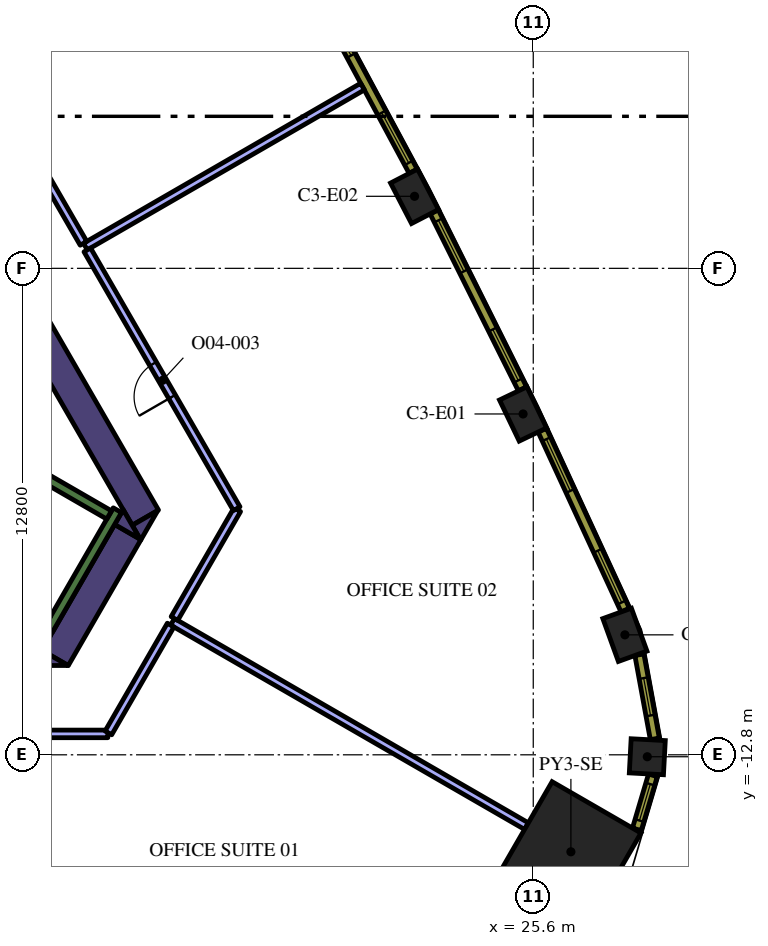
"""IFC4 building model, lengths in metres.
Left out: names, types, materials, properties, quantities, classifications, styles, units other than length and angle.
Written with IfcOpenShell. Run it as: python <this file> out.ifc"""

import sys

from ifc_helpers import new_model, si_unit, direction, frame, frame_2d, origin, origin_2d, place, context, subcontext, project, spatial, polyline, rectangle, outline, extrude, element, fill, save


model = new_model("IFC4")
c1 = context("Model", 3, precision=1e-05, world=origin(), true_north=direction((0.0, 1.0)))
c2 = subcontext(c1, "Body", "Model", "MODEL_VIEW")
j1 = project(units=[si_unit("LENGTHUNIT", "METRE"), si_unit("PLANEANGLEUNIT", "RADIAN")], contexts=[c1])
p1 = place(None, origin())
s1 = spatial("IfcSite", under=j1, at=p1, CompositionType="ELEMENT")
p2 = place(p1, origin())
s2 = spatial("IfcBuilding", under=s1, at=p2, CompositionType="ELEMENT")
p3 = place(p2, frame((0.0, 0.0, 179.4)))
s3 = spatial("IfcBuildingStorey", under=s2, at=p3, CompositionType="ELEMENT", Elevation=179.4)
p4 = place(p3, frame((26.591, -15.352, 0.0), z_axis=(0.0, 0.0, 1.0), x_axis=(0.866025403784, -0.5, 0.0)))
e1 = element("IfcColumn", 1, at=p4, inside=s3, PredefinedType="COLUMN", context=c2, shape_type="SweptSolid", body=[
    extrude(rectangle(XDim=2.7, YDim=2.7, at=origin_2d()), origin(), (0.0, 0.0, 1.0), 4.2),
])
p5 = place(p3, frame((28.601, -12.851, 0.0), z_axis=(0.0, 0.0, 1.0), x_axis=(0.0533921468, 0.998573622053, 0.0)))
e2 = element("IfcColumn", 2, at=p5, inside=s3, PredefinedType="COLUMN", context=c2, shape_type="SweptSolid", body=[
    extrude(rectangle(XDim=0.9, YDim=0.9, at=origin_2d()), origin(), (0.0, 0.0, 1.0), 4.2),
])
for number, where, z_axis, x_axis in (
    (3, (28.012, -9.644, 0.0), (0.0, 0.0, 1.0), (-0.341, 0.94, 0.0)),
    (4, (25.332, -3.832, 0.0), (0.0, 0.0, 1.0), (-0.433, 0.902, 0.0)),
    (5, (22.476, 1.896, 0.0), (0.0, 0.0, 1.0), (-0.46, 0.888, 0.0)),
):
    element("IfcColumn", number, at=place(p3, frame(where, z_axis=z_axis, x_axis=x_axis)), inside=s3, PredefinedType="COLUMN", context=c2, shape_type="SweptSolid", body=[
        extrude(rectangle(XDim=1.2, YDim=0.8, at=origin_2d()), origin(), (0.0, 0.0, 1.0), 4.2),
    ])
p6 = place(p3, frame((9.129, 4.289, 0.0), z_axis=(0.0, 0.0, 1.0), x_axis=(0.499995742806, -0.866027861663, 0.0)))
e6 = element("IfcWall", 6, at=p6, inside=s3, PredefinedType="SOLIDWALL", context=c2, shape_type="SweptSolid", body=[
    extrude(rectangle(XDim=12.527, YDim=0.8, at=frame_2d((6.264, 0.0))), origin(), (0.0, 0.0, 1.0), 4.2),
])
p7 = place(p3, origin())
e7 = element("IfcWall", 7, at=p7, inside=s3, PredefinedType="SOLIDWALL", context=c2, shape_type="SweptSolid", body=[
    extrude(outline(polyline([(15.271, -7.15), (15.047, -6.762), (15.719, -6.374), (15.271, -7.15)])), origin(), (0.0, 0.0, 1.0), 4.2),
])
p8 = place(p3, frame((13.018, -10.252, 0.0), z_axis=(0.0, 0.0, 1.0), x_axis=(0.499984020225, 0.866034629516, 0.0)))
e8 = element("IfcWall", 8, at=p8, inside=s3, PredefinedType="SOLIDWALL", context=c2, shape_type="SweptSolid", body=[
    extrude(rectangle(XDim=3.824, YDim=0.8, at=frame_2d((1.912, 0.0))), origin(), (0.0, 0.0, 1.0), 4.2),
])
e9 = element("IfcWall", 9, at=p7, inside=s3, PredefinedType="SOLIDWALL", context=c2, shape_type="SweptSolid", body=[
    extrude(outline(polyline([(12.671, -10.053), (13.358, -10.45), (12.442, -10.45), (12.671, -10.053)])), origin(), (0.0, 0.0, 1.0), 4.2),
])
e10 = element("IfcWall", 10, at=p7, inside=s3, PredefinedType="SOLIDWALL", context=c2, shape_type="SweptSolid", body=[
    extrude(outline(polyline([(14.809, -6.35), (15.257, -7.126), (14.585, -6.738), (14.809, -6.35)])), origin(), (0.0, 0.0, 1.0), 4.2),
])
p9 = place(p3, frame((12.84, -9.511, 0.0), z_axis=(0.0, 0.0, 1.0), x_axis=(0.499997733992, 0.866026712061, 0.0)))
e11 = element("IfcWall", 11, at=p9, inside=s3, PredefinedType="SOLIDWALL", context=c2, shape_type="SweptSolid", body=[
    extrude(rectangle(XDim=3.634, YDim=0.25, at=frame_2d((1.817, 0.0))), origin(), (0.0, 0.0, 1.0), 4.2),
])
p10 = place(p3, frame((8.334, -2.964, 0.0), z_axis=(0.0, 0.0, 1.0), x_axis=(0.866016039709, -0.500016218704, 0.0)))
e12 = element("IfcWall", 12, at=p10, inside=s3, PredefinedType="SOLIDWALL", context=c2, shape_type="SweptSolid", body=[
    extrude(rectangle(XDim=7.05, YDim=0.25, at=frame_2d((3.525, 0.0))), origin(), (0.0, 0.0, 1.0), 4.2),
])
p11 = place(p3, frame((16.108, -9.3, 0.0), z_axis=(0.0, 0.0, 1.0), x_axis=(0.866027180319, -0.499996922939, 0.0)))
e13 = element("IfcWall", 13, at=p11, inside=s3, PredefinedType="PARTITIONING", context=c2, shape_type="SweptSolid", body=[
    extrude(rectangle(XDim=10.754, YDim=0.2, at=frame_2d((5.377, 0.0))), origin(), (0.0, 0.0, 1.0), 3.15),
])
p12 = place(p3, frame((9.717, -12.25, 0.0), z_axis=(0.0, 0.0, 1.0), x_axis=(1.0, 0.0, 0.0)))
e14 = element("IfcWall", 14, at=p12, inside=s3, PredefinedType="PARTITIONING", context=c2, shape_type="SweptSolid", body=[
    extrude(rectangle(XDim=4.688, YDim=0.2, at=frame_2d((2.344, 0.0))), origin(), (0.0, 0.0, 1.0), 3.15),
])
p13 = place(p12, frame((1.8, 0.0, 0.0)))
e15 = element("IfcOpeningElement", 15, at=p13, cuts=e14, PredefinedType="OPENING", context=c2, shape_type="SweptSolid", body=[
    extrude(rectangle(XDim=1.0, YDim=2.1, at=frame_2d((0.5, 1.05))), frame((0.0, 0.11, 0.0), z_axis=(0.0, -1.0, 0.0), x_axis=(1.0, 0.0, 0.0)), (0.0, 0.0, 1.0), 0.22),
])
p14 = place(p3, frame((14.42, -12.224, 0.0), z_axis=(0.0, 0.0, 1.0), x_axis=(0.500001965626, 0.866024268927, 0.0)))
e16 = element("IfcWall", 16, at=p14, inside=s3, PredefinedType="PARTITIONING", context=c2, shape_type="SweptSolid", body=[
    extrude(rectangle(XDim=3.276, YDim=0.2, at=frame_2d((1.638, 0.0))), origin(), (0.0, 0.0, 1.0), 3.15),
])
p15 = place(p3, frame((13.815, 0.572, 0.0), z_axis=(0.0, 0.0, 1.0), x_axis=(0.866036391575, 0.499980968105, 0.0)))
e17 = element("IfcWall", 17, at=p15, inside=s3, PredefinedType="PARTITIONING", context=c2, shape_type="SweptSolid", body=[
    extrude(rectangle(XDim=8.42, YDim=0.2, at=frame_2d((4.21, 0.0))), origin(), (0.0, 0.0, 1.0), 3.15),
])
p16 = place(p3, frame((16.158, -9.213, 0.0), z_axis=(0.0, 0.0, 1.0), x_axis=(0.499990919662, 0.866030646256, 0.0)))
e18 = element("IfcWall", 18, at=p16, inside=s3, PredefinedType="PARTITIONING", context=c2, shape_type="SweptSolid", body=[
    extrude(rectangle(XDim=3.306, YDim=0.2, at=frame_2d((1.653, 0.0))), origin(), (0.0, 0.0, 1.0), 3.15),
])
p17 = place(p3, frame((17.796, -6.324, 0.0), z_axis=(0.0, 0.0, 1.0), x_axis=(-0.500026166427, 0.866010296064, 0.0)))
e19 = element("IfcWall", 19, at=p17, inside=s3, PredefinedType="PARTITIONING", context=c2, shape_type="SweptSolid", body=[
    extrude(rectangle(XDim=7.863, YDim=0.2, at=frame_2d((3.931, 0.0))), origin(), (0.0, 0.0, 1.0), 3.15),
])
p18 = place(p17, frame((3.4, 0.0, 0.0)))
e20 = element("IfcOpeningElement", 20, at=p18, cuts=e19, PredefinedType="OPENING", context=c2, shape_type="SweptSolid", body=[
    extrude(rectangle(XDim=1.0, YDim=2.1, at=frame_2d((0.5, 1.05))), frame((0.0, 0.11, 0.0), z_axis=(0.0, -1.0, 0.0), x_axis=(1.0, 0.0, 0.0)), (0.0, 0.0, 1.0), 0.22),
])
p19 = place(p3, frame((13.765, 0.659, 0.0), z_axis=(0.0, 0.0, 1.0), x_axis=(-0.500046568876, 0.865998515562, 0.0)))
e21 = element("IfcWall", 21, at=p19, inside=s3, PredefinedType="PARTITIONING", context=c2, shape_type="SweptSolid", body=[
    extrude(rectangle(XDim=2.782, YDim=0.2, at=frame_2d((1.391, 0.0))), origin(), (0.0, 0.0, 1.0), 3.15),
])
p20 = place(p3, frame((28.326, -14.76, 0.0), z_axis=(0.0, 0.0, 1.0), x_axis=(0.284413721403, 0.958701640281, 0.0)))
e22 = element("IfcWall", 22, at=p20, inside=s3, PredefinedType="SOLIDWALL", context=c2, shape_type="SweptSolid", body=[
    extrude(rectangle(XDim=1.482, YDim=0.24, at=frame_2d((0.741, 0.0))), origin(), (0.0, 0.0, 1.0), 3.95),
])
p21 = place(p20, frame((0.241, 0.0, 0.9)))
e23 = element("IfcOpeningElement", 23, at=p21, cuts=e22, PredefinedType="OPENING", context=c2, shape_type="SweptSolid", body=[
    extrude(rectangle(XDim=1.0, YDim=2.55, at=frame_2d((0.5, 1.275))), frame((0.0, 0.13, 0.0), z_axis=(0.0, -1.0, 0.0), x_axis=(1.0, 0.0, 0.0)), (0.0, 0.0, 1.0), 0.26),
])
p22 = place(p3, frame((28.799, -12.38, 0.0), z_axis=(0.0, 0.0, 1.0), x_axis=(-0.180737189259, 0.983531427265, 0.0)))
e24 = element("IfcWall", 24, at=p22, inside=s3, PredefinedType="SOLIDWALL", context=c2, shape_type="SweptSolid", body=[
    extrude(rectangle(XDim=2.25, YDim=0.24, at=frame_2d((1.125, 0.0))), origin(), (0.0, 0.0, 1.0), 3.95),
])
p23 = place(p22, frame((0.625, 0.0, 0.9)))
e25 = element("IfcOpeningElement", 25, at=p23, cuts=e24, PredefinedType="OPENING", context=c2, shape_type="SweptSolid", body=[
    extrude(rectangle(XDim=1.0, YDim=2.55, at=frame_2d((0.5, 1.275))), frame((0.0, 0.13, 0.0), z_axis=(0.0, -1.0, 0.0), x_axis=(1.0, 0.0, 0.0)), (0.0, 0.0, 1.0), 0.26),
])
p24 = place(p3, frame((28.02, -8.992, 0.0), z_axis=(0.0, 0.0, 1.0), x_axis=(-0.418722559465, 0.908114209885, 0.0)))
e26 = element("IfcWall", 26, at=p24, inside=s3, PredefinedType="SOLIDWALL", context=c2, shape_type="SweptSolid", body=[
    extrude(rectangle(XDim=5.213, YDim=0.24, at=frame_2d((2.606, 0.0))), origin(), (0.0, 0.0, 1.0), 3.95),
])
p25 = place(p24, frame((0.221, 0.0, 0.9)))
e27 = element("IfcOpeningElement", 27, at=p25, cuts=e26, PredefinedType="OPENING", context=c2, shape_type="SweptSolid", body=[
    extrude(rectangle(XDim=1.5, YDim=2.55, at=frame_2d((0.75, 1.275))), frame((0.0, 0.13, 0.0), z_axis=(0.0, -1.0, 0.0), x_axis=(1.0, 0.0, 0.0)), (0.0, 0.0, 1.0), 0.26),
])
p26 = place(p24, frame((3.452, 0.0, 0.9)))
e28 = element("IfcOpeningElement", 28, at=p26, cuts=e26, PredefinedType="OPENING", context=c2, shape_type="SweptSolid", body=[
    extrude(rectangle(XDim=1.5, YDim=2.55, at=frame_2d((0.75, 1.275))), frame((0.0, 0.13, 0.0), z_axis=(0.0, -1.0, 0.0), x_axis=(1.0, 0.0, 0.0)), (0.0, 0.0, 1.0), 0.26),
])
p27 = place(p3, frame((25.316, -3.171, 0.0), z_axis=(0.0, 0.0, 1.0), x_axis=(-0.446256171312, 0.8949052629, 0.0)))
e29 = element("IfcWall", 29, at=p27, inside=s3, PredefinedType="SOLIDWALL", context=c2, shape_type="SweptSolid", body=[
    extrude(rectangle(XDim=5.203, YDim=0.24, at=frame_2d((2.602, 0.0))), origin(), (0.0, 0.0, 1.0), 3.95),
])
p28 = place(p27, frame((0.248, 0.0, 0.9)))
e30 = element("IfcOpeningElement", 30, at=p28, cuts=e29, PredefinedType="OPENING", context=c2, shape_type="SweptSolid", body=[
    extrude(rectangle(XDim=1.5, YDim=2.55, at=frame_2d((0.75, 1.275))), frame((0.0, 0.13, 0.0), z_axis=(0.0, -1.0, 0.0), x_axis=(1.0, 0.0, 0.0)), (0.0, 0.0, 1.0), 0.26),
])
p29 = place(p27, frame((3.455, 0.0, 0.9)))
e31 = element("IfcOpeningElement", 31, at=p29, cuts=e29, PredefinedType="OPENING", context=c2, shape_type="SweptSolid", body=[
    extrude(rectangle(XDim=1.5, YDim=2.55, at=frame_2d((0.75, 1.275))), frame((0.0, 0.13, 0.0), z_axis=(0.0, -1.0, 0.0), x_axis=(1.0, 0.0, 0.0)), (0.0, 0.0, 1.0), 0.26),
])
p30 = place(p3, frame((22.44, 2.555, 0.0), z_axis=(0.0, 0.0, 1.0), x_axis=(-0.473349833294, 0.880874528704, 0.0)))
e32 = element("IfcWall", 32, at=p30, inside=s3, PredefinedType="SOLIDWALL", context=c2, shape_type="SweptSolid", body=[
    extrude(rectangle(XDim=5.204, YDim=0.24, at=frame_2d((2.602, 0.0))), origin(), (0.0, 0.0, 1.0), 3.95),
])
p31 = place(p30, frame((0.248, 0.0, 0.9)))
e33 = element("IfcOpeningElement", 33, at=p31, cuts=e32, PredefinedType="OPENING", context=c2, shape_type="SweptSolid", body=[
    extrude(rectangle(XDim=1.5, YDim=2.55, at=frame_2d((0.75, 1.275))), frame((0.0, 0.13, 0.0), z_axis=(0.0, -1.0, 0.0), x_axis=(1.0, 0.0, 0.0)), (0.0, 0.0, 1.0), 0.26),
])
p32 = place(p30, frame((3.455, 0.0, 0.9)))
e34 = element("IfcOpeningElement", 34, at=p32, cuts=e32, PredefinedType="OPENING", context=c2, shape_type="SweptSolid", body=[
    extrude(rectangle(XDim=1.5, YDim=2.55, at=frame_2d((0.75, 1.275))), frame((0.0, 0.13, 0.0), z_axis=(0.0, -1.0, 0.0), x_axis=(1.0, 0.0, 0.0)), (0.0, 0.0, 1.0), 0.26),
])
p33 = place(p18, origin())
e35 = element("IfcDoor", 35, at=p33, inside=s3, OperationType="SINGLE_SWING_LEFT", PredefinedType="DOOR", context=c2, shape_type="SweptSolid", body=[
    extrude(rectangle(XDim=1.0, YDim=2.1, at=frame_2d((0.5, 1.05))), frame((0.0, 0.025, 0.0), z_axis=(0.0, -1.0, 0.0), x_axis=(1.0, 0.0, 0.0)), (0.0, 0.0, 1.0), 0.05),
])
fill(e20, e35)
p34 = place(p21, origin())
e36 = element("IfcWindow", 36, at=p34, inside=s3, PartitioningType="SINGLE_PANEL", PredefinedType="WINDOW", context=c2, shape_type="SweptSolid", body=[
    extrude(rectangle(XDim=1.0, YDim=2.55, at=frame_2d((0.5, 1.275))), frame((0.0, 0.04, 0.0), z_axis=(0.0, -1.0, 0.0), x_axis=(1.0, 0.0, 0.0)), (0.0, 0.0, 1.0), 0.06),
])
fill(e23, e36)
p35 = place(p23, origin())
e37 = element("IfcWindow", 37, at=p35, inside=s3, PartitioningType="SINGLE_PANEL", PredefinedType="WINDOW", context=c2, shape_type="SweptSolid", body=[
    extrude(rectangle(XDim=1.0, YDim=2.55, at=frame_2d((0.5, 1.275))), frame((0.0, 0.04, 0.0), z_axis=(0.0, -1.0, 0.0), x_axis=(1.0, 0.0, 0.0)), (0.0, 0.0, 1.0), 0.06),
])
fill(e25, e37)
p36 = place(p25, origin())
e38 = element("IfcWindow", 38, at=p36, inside=s3, PartitioningType="SINGLE_PANEL", PredefinedType="WINDOW", context=c2, shape_type="SweptSolid", body=[
    extrude(rectangle(XDim=1.5, YDim=2.55, at=frame_2d((0.75, 1.275))), frame((0.0, 0.04, 0.0), z_axis=(0.0, -1.0, 0.0), x_axis=(1.0, 0.0, 0.0)), (0.0, 0.0, 1.0), 0.06),
])
fill(e27, e38)
p37 = place(p26, origin())
e39 = element("IfcWindow", 39, at=p37, inside=s3, PartitioningType="SINGLE_PANEL", PredefinedType="WINDOW", context=c2, shape_type="SweptSolid", body=[
    extrude(rectangle(XDim=1.5, YDim=2.55, at=frame_2d((0.75, 1.275))), frame((0.0, 0.04, 0.0), z_axis=(0.0, -1.0, 0.0), x_axis=(1.0, 0.0, 0.0)), (0.0, 0.0, 1.0), 0.06),
])
fill(e28, e39)
p38 = place(p28, origin())
e40 = element("IfcWindow", 40, at=p38, inside=s3, PartitioningType="SINGLE_PANEL", PredefinedType="WINDOW", context=c2, shape_type="SweptSolid", body=[
    extrude(rectangle(XDim=1.5, YDim=2.55, at=frame_2d((0.75, 1.275))), frame((0.0, 0.04, 0.0), z_axis=(0.0, -1.0, 0.0), x_axis=(1.0, 0.0, 0.0)), (0.0, 0.0, 1.0), 0.06),
])
fill(e30, e40)
p39 = place(p29, origin())
e41 = element("IfcWindow", 41, at=p39, inside=s3, PartitioningType="SINGLE_PANEL", PredefinedType="WINDOW", context=c2, shape_type="SweptSolid", body=[
    extrude(rectangle(XDim=1.5, YDim=2.55, at=frame_2d((0.75, 1.275))), frame((0.0, 0.04, 0.0), z_axis=(0.0, -1.0, 0.0), x_axis=(1.0, 0.0, 0.0)), (0.0, 0.0, 1.0), 0.06),
])
fill(e31, e41)
p40 = place(p31, origin())
e42 = element("IfcWindow", 42, at=p40, inside=s3, PartitioningType="SINGLE_PANEL", PredefinedType="WINDOW", context=c2, shape_type="SweptSolid", body=[
    extrude(rectangle(XDim=1.5, YDim=2.55, at=frame_2d((0.75, 1.275))), frame((0.0, 0.04, 0.0), z_axis=(0.0, -1.0, 0.0), x_axis=(1.0, 0.0, 0.0)), (0.0, 0.0, 1.0), 0.06),
])
fill(e33, e42)
p41 = place(p32, origin())
e43 = element("IfcWindow", 43, at=p41, inside=s3, PartitioningType="SINGLE_PANEL", PredefinedType="WINDOW", context=c2, shape_type="SweptSolid", body=[
    extrude(rectangle(XDim=1.5, YDim=2.55, at=frame_2d((0.75, 1.275))), frame((0.0, 0.04, 0.0), z_axis=(0.0, -1.0, 0.0), x_axis=(1.0, 0.0, 0.0)), (0.0, 0.0, 1.0), 0.06),
])
fill(e34, e43)
save(model, sys.argv[1])
